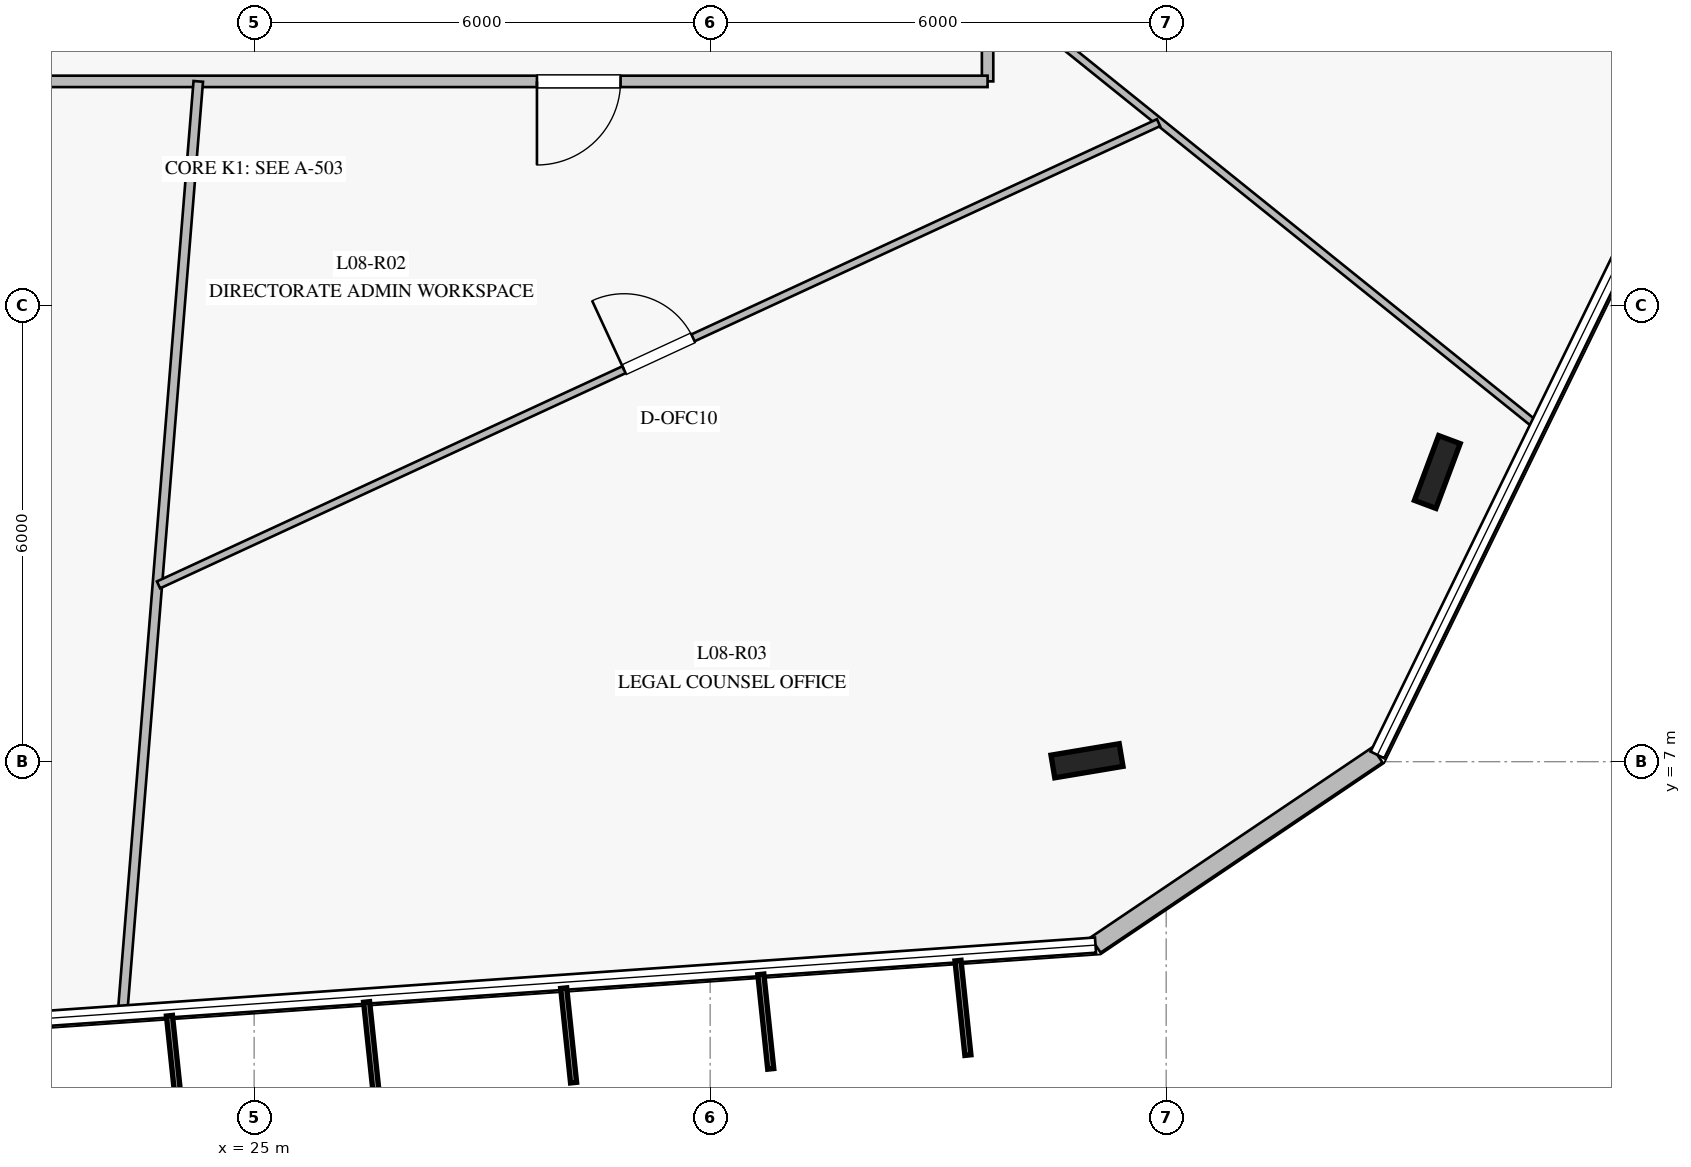
"""IFC4 building model, lengths in metres.
Left out: names, types, materials, properties, quantities, classifications, styles, units other than length and angle.
Written with IfcOpenShell. Run it as: python <this file> out.ifc"""

import sys

from ifc_helpers import new_model, si_unit, direction, frame, frame_2d, origin, origin_2d, place, context, subcontext, project, spatial, rectangle, i_section, extrude, element, fill, save


model = new_model("IFC4")
c1 = context("Model", 3, precision=1e-05, world=origin(), true_north=direction((0.0, 1.0)))
c2 = subcontext(c1, "Body", "Model", "MODEL_VIEW")
j1 = project(units=[si_unit("LENGTHUNIT", "METRE"), si_unit("PLANEANGLEUNIT", "RADIAN")], contexts=[c1])
p1 = place(None, origin())
s1 = spatial("IfcSite", under=j1, at=p1, CompositionType="ELEMENT")
p2 = place(p1, origin())
s2 = spatial("IfcBuilding", under=s1, at=p2, CompositionType="ELEMENT")
p3 = place(p2, frame((0.0, 0.0, 36.0)))
s3 = spatial("IfcBuildingStorey", under=s2, at=p3, CompositionType="ELEMENT", Elevation=36.0)
for number, where, z_axis, x_axis in (
    (1, (35.958, 7.012, 0.0), (0.0, 0.0, 1.0), (0.986, 0.165, 0.0)),
    (2, (40.567, 10.811, 0.0), (0.0, 0.0, 1.0), (0.35, 0.937, 0.0)),
):
    element("IfcColumn", number, at=place(p3, frame(where, z_axis=z_axis, x_axis=x_axis)), inside=s3, PredefinedType="COLUMN", context=c2, shape_type="SweptSolid", body=[
        extrude(i_section(OverallWidth=0.302, OverallDepth=0.91, WebThickness=0.021, FlangeThickness=0.04, at=origin_2d()), origin(), (0.0, 0.0, 1.0), 4.0),
    ])
p4 = place(p3, frame((36.07, 4.587, 0.0), z_axis=(0.0, 0.0, 1.0), x_axis=(0.828990349764, 0.559262907762, 0.0)))
e3 = element("IfcWall", 3, at=p4, inside=s3, PredefinedType="STANDARD", context=c2, shape_type="SweptSolid", body=[
    extrude(rectangle(XDim=4.474, YDim=0.24, at=frame_2d((2.237, 0.0))), origin(), (0.0, 0.0, 1.0), 3.76),
])
p5 = place(p3, frame((34.65, 34.05, 0.0), z_axis=(0.0, 0.0, 1.0), x_axis=(0.0, -1.0, 0.0)))
e4 = element("IfcWall", 4, at=p5, inside=s3, PredefinedType="PARTITIONING", context=c2, shape_type="SweptSolid", body=[
    extrude(rectangle(XDim=18.1, YDim=0.15, at=frame_2d((9.05, 0.0))), origin(), (0.0, 0.0, 1.0), 3.21),
])
p6 = place(p5, frame((11.691, 0.0, 0.0)))
e5 = element("IfcOpeningElement", 5, at=p6, cuts=e4, PredefinedType="OPENING", context=c2, shape_type="SweptSolid", body=[
    extrude(rectangle(XDim=1.1, YDim=2.2, at=frame_2d((0.55, 1.1))), frame((0.0, 0.085, 0.0), z_axis=(0.0, -1.0, 0.0), x_axis=(1.0, 0.0, 0.0)), (0.0, 0.0, 1.0), 0.17),
])
p7 = place(p5, frame((3.343, 0.0, 0.0)))
e6 = element("IfcOpeningElement", 6, at=p7, cuts=e4, PredefinedType="OPENING", context=c2, shape_type="SweptSolid", body=[
    extrude(rectangle(XDim=1.1, YDim=2.2, at=frame_2d((0.55, 1.1))), frame((0.0, 0.085, 0.0), z_axis=(0.0, -1.0, 0.0), x_axis=(1.0, 0.0, 0.0)), (0.0, 0.0, 1.0), 0.17),
])
p8 = place(p3, frame((34.65, 15.95, 0.0), z_axis=(0.0, 0.0, 1.0), x_axis=(-1.0, 0.0, 0.0)))
e7 = element("IfcWall", 7, at=p8, inside=s3, PredefinedType="PARTITIONING", context=c2, shape_type="SweptSolid", body=[
    extrude(rectangle(XDim=19.3, YDim=0.15, at=frame_2d((9.65, 0.0))), origin(), (0.0, 0.0, 1.0), 3.21),
])
p9 = place(p8, frame((14.112, 0.0, 0.0)))
e8 = element("IfcOpeningElement", 8, at=p9, cuts=e7, PredefinedType="OPENING", context=c2, shape_type="SweptSolid", body=[
    extrude(rectangle(XDim=1.1, YDim=2.2, at=frame_2d((0.55, 1.1))), frame((0.0, 0.085, 0.0), z_axis=(0.0, -1.0, 0.0), x_axis=(1.0, 0.0, 0.0)), (0.0, 0.0, 1.0), 0.17),
])
p10 = place(p8, frame((4.829, 0.0, 0.0)))
e9 = element("IfcOpeningElement", 9, at=p10, cuts=e7, PredefinedType="OPENING", context=c2, shape_type="SweptSolid", body=[
    extrude(rectangle(XDim=1.1, YDim=2.2, at=frame_2d((0.55, 1.1))), frame((0.0, 0.085, 0.0), z_axis=(0.0, -1.0, 0.0), x_axis=(1.0, 0.0, 0.0)), (0.0, 0.0, 1.0), 0.17),
])
p11 = place(p3, frame((24.265, 15.95, 0.0), z_axis=(0.0, 0.0, 1.0), x_axis=(-0.081013374565, -0.996713014434, 0.0)))
e10 = element("IfcWall", 10, at=p11, inside=s3, PredefinedType="PARTITIONING", context=c2, shape_type="SweptSolid", body=[
    extrude(rectangle(XDim=12.28, YDim=0.125, at=frame_2d((6.14, 0.0))), origin(), (0.0, 0.0, 1.0), 3.05),
])
p12 = place(p3, frame((34.65, 17.235, 0.0), z_axis=(0.0, 0.0, 1.0), x_axis=(0.779103283346, -0.626895584511, 0.0)))
e11 = element("IfcWall", 11, at=p12, inside=s3, PredefinedType="MOVABLE", context=c2, shape_type="SweptSolid", body=[
    extrude(rectangle(XDim=9.271, YDim=0.1, at=frame_2d((4.635, 0.0))), origin(), (0.0, 0.0, 1.0), 3.06),
])
p13 = place(p3, frame((23.742, 9.326, 0.0), z_axis=(0.0, 0.0, 1.0), x_axis=(0.907733462567, 0.419547328601, 0.0)))
e12 = element("IfcWall", 12, at=p13, inside=s3, PredefinedType="MOVABLE", context=c2, shape_type="SweptSolid", body=[
    extrude(rectangle(XDim=14.494, YDim=0.1, at=frame_2d((7.247, 0.0))), origin(), (0.0, 0.0, 1.0), 3.05),
])
p14 = place(p13, frame((6.747, 0.0, 0.0)))
e13 = element("IfcOpeningElement", 13, at=p14, cuts=e12, PredefinedType="OPENING", context=c2, shape_type="SweptSolid", body=[
    extrude(rectangle(XDim=1.0, YDim=2.15, at=frame_2d((0.5, 1.075))), frame((0.0, 0.06, 0.0), z_axis=(0.0, -1.0, 0.0), x_axis=(1.0, 0.0, 0.0)), (0.0, 0.0, 1.0), 0.12),
])
p15 = place(p10, origin())
e14 = element("IfcDoor", 14, at=p15, inside=s3, OperationType="SINGLE_SWING_RIGHT", PredefinedType="DOOR", context=c2, shape_type="SweptSolid", body=[
    extrude(rectangle(XDim=1.1, YDim=2.2, at=frame_2d((0.55, 1.1))), frame((0.0, 0.025, 0.0), z_axis=(0.0, -1.0, 0.0), x_axis=(1.0, 0.0, 0.0)), (0.0, 0.0, 1.0), 0.05),
])
fill(e9, e14)
p16 = place(p14, origin())
e15 = element("IfcDoor", 15, at=p16, inside=s3, OperationType="SINGLE_SWING_LEFT", PredefinedType="DOOR", context=c2, shape_type="SweptSolid", body=[
    extrude(rectangle(XDim=1.0, YDim=2.15, at=frame_2d((0.5, 1.075))), frame((0.0, 0.025, 0.0), z_axis=(0.0, -1.0, 0.0), x_axis=(1.0, 0.0, 0.0)), (0.0, 0.0, 1.0), 0.05),
])
fill(e13, e15)
save(model, sys.argv[1])
